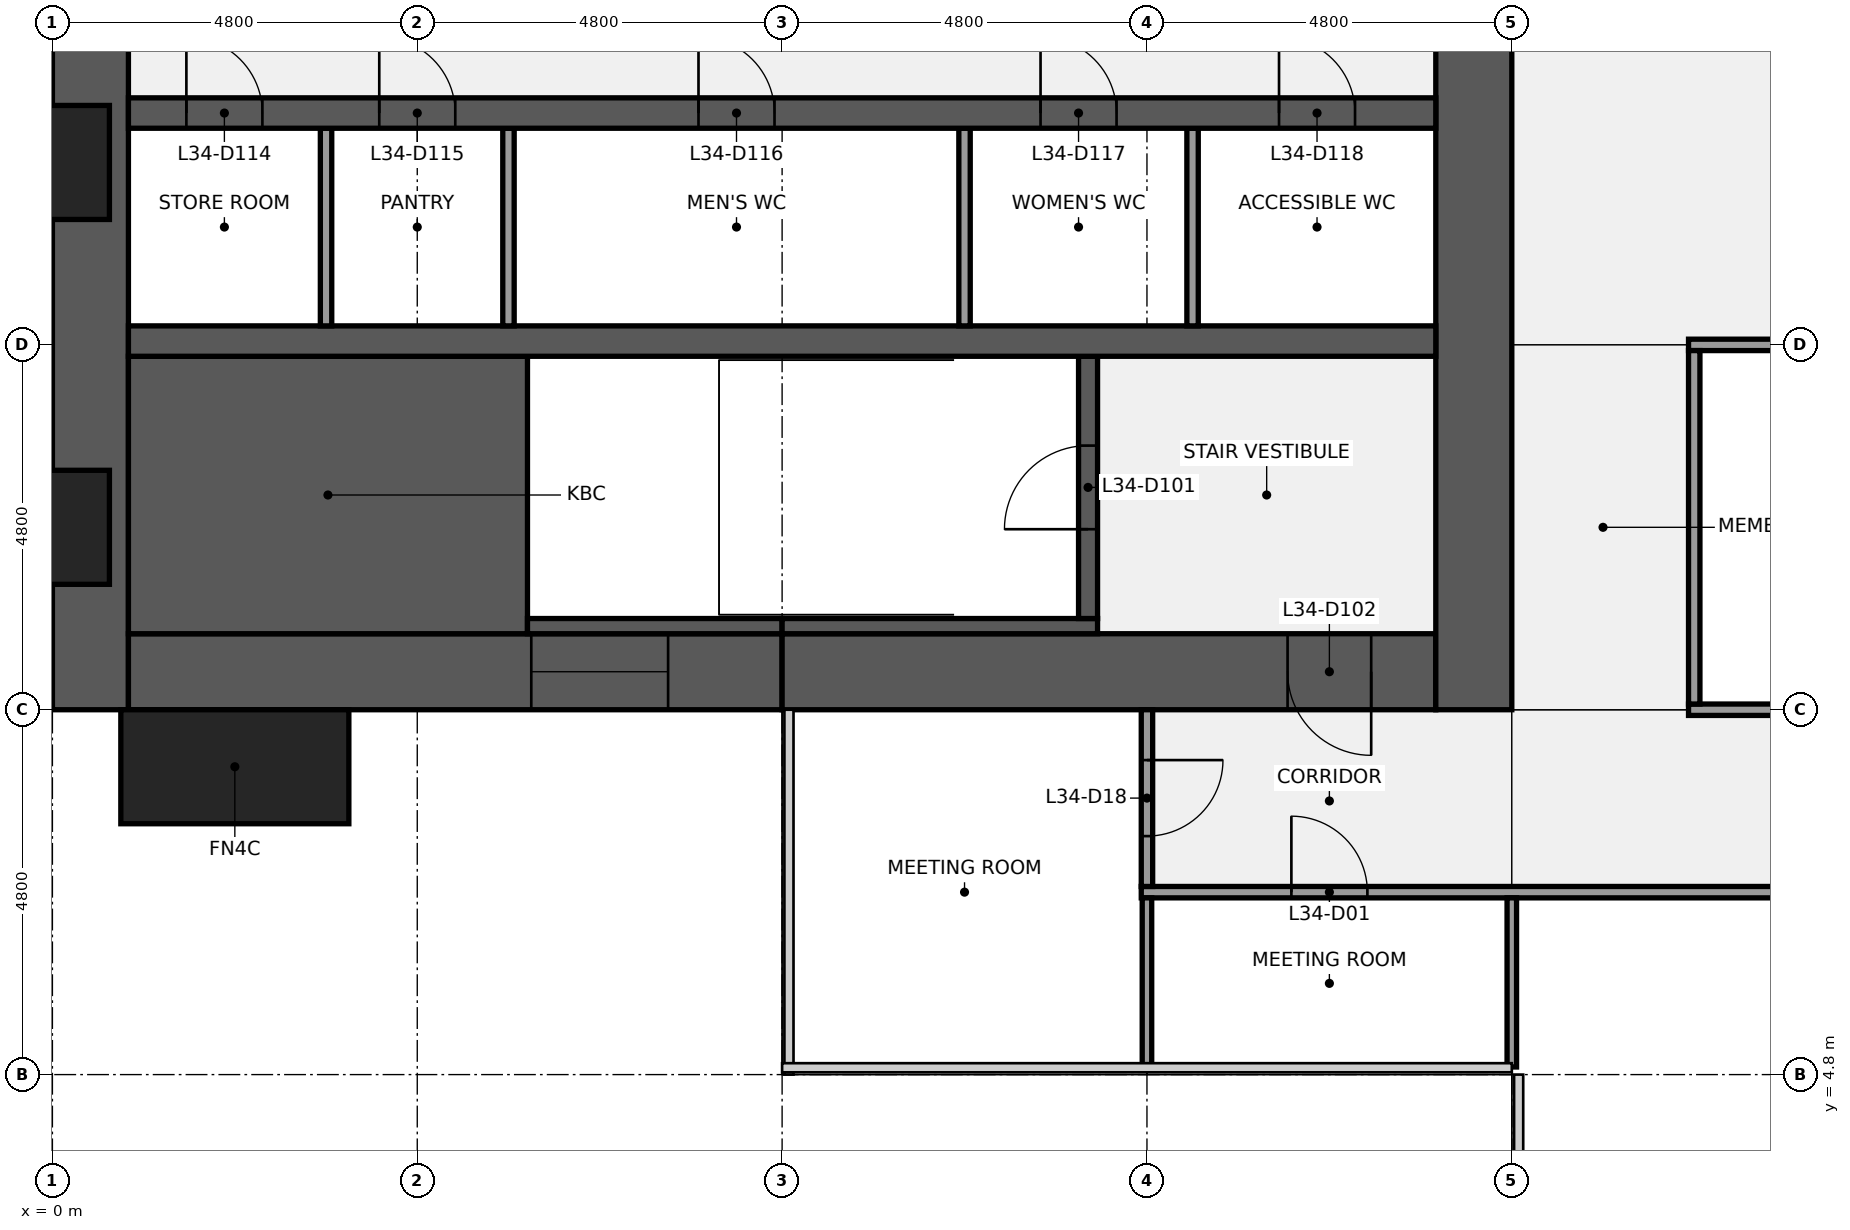
"""IFC4 building model, lengths in metres.
Left out: names, types, materials, properties, quantities, classifications, styles, units other than length and angle.
Written with IfcOpenShell. Run it as: python <this file> out.ifc"""

import sys

from ifc_helpers import new_model, si_unit, direction, frame, frame_2d, origin, origin_2d, place, context, subcontext, project, spatial, rectangle, extrude, element, fill, save


model = new_model("IFC4")
c1 = context("Model", 3, precision=1e-05, world=origin(), true_north=direction((0.0, 1.0)))
c2 = subcontext(c1, "Body", "Model", "MODEL_VIEW")
j1 = project(units=[si_unit("LENGTHUNIT", "METRE"), si_unit("PLANEANGLEUNIT", "RADIAN")], contexts=[c1])
p1 = place(None, origin())
s1 = spatial("IfcSite", under=j1, at=p1, CompositionType="ELEMENT")
p2 = place(p1, origin())
s2 = spatial("IfcBuilding", under=s1, at=p2, CompositionType="ELEMENT")
p3 = place(p2, frame((0.0, 0.0, 156.1)))
s3 = spatial("IfcBuildingStorey", under=s2, at=p3, CompositionType="ELEMENT", Elevation=156.1)
p4 = place(p3, frame((0.5, 9.6, 0.0), z_axis=(0.0, 0.0, 1.0), x_axis=(0.0, 1.0, 0.0)))
e1 = element("IfcWall", 1, at=p4, inside=s3, PredefinedType="SHEAR", context=c2, shape_type="SweptSolid", body=[
    extrude(rectangle(XDim=28.8, YDim=1.0, at=frame_2d((14.4, 0.0))), origin(), (0.0, 0.0, 1.0), 3.84),
])
p5 = place(p4, frame((8.85, 0.0, 0.9)))
e2 = element("IfcOpeningElement", 2, at=p5, cuts=e1, PredefinedType="OPENING", context=c2, shape_type="SweptSolid", body=[
    extrude(rectangle(XDim=1.5, YDim=1.5, at=frame_2d((0.75, 0.75))), frame((0.0, 0.51, 0.0), z_axis=(0.0, -1.0, 0.0), x_axis=(1.0, 0.0, 0.0)), (0.0, 0.0, 1.0), 1.02),
])
p6 = place(p4, frame((18.45, 0.0, 0.9)))
e3 = element("IfcOpeningElement", 3, at=p6, cuts=e1, PredefinedType="OPENING", context=c2, shape_type="SweptSolid", body=[
    extrude(rectangle(XDim=1.5, YDim=1.5, at=frame_2d((0.75, 0.75))), frame((0.0, 0.51, 0.0), z_axis=(0.0, -1.0, 0.0), x_axis=(1.0, 0.0, 0.0)), (0.0, 0.0, 1.0), 1.02),
])
p7 = place(p3, frame((9.6, 10.1, 0.0), z_axis=(0.0, 0.0, 1.0), x_axis=(-1.0, 0.0, 0.0)))
e4 = element("IfcWall", 4, at=p7, inside=s3, PredefinedType="SHEAR", context=c2, shape_type="SweptSolid", body=[
    extrude(rectangle(XDim=8.6, YDim=1.0, at=frame_2d((4.3, 0.0))), origin(), (0.0, 0.0, 1.0), 3.84),
])
p8 = place(p7, frame((1.5, 0.0, 0.9)))
e5 = element("IfcOpeningElement", 5, at=p8, cuts=e4, PredefinedType="OPENING", context=c2, shape_type="SweptSolid", body=[
    extrude(rectangle(XDim=1.8, YDim=1.5, at=frame_2d((0.9, 0.75))), frame((0.0, 0.51, 0.0), z_axis=(0.0, -1.0, 0.0), x_axis=(1.0, 0.0, 0.0)), (0.0, 0.0, 1.0), 1.02),
])
p9 = place(p3, frame((18.2, 10.1, 0.0), z_axis=(0.0, 0.0, 1.0), x_axis=(-1.0, 0.0, 0.0)))
e6 = element("IfcWall", 6, at=p9, inside=s3, PredefinedType="SHEAR", context=c2, shape_type="SweptSolid", body=[
    extrude(rectangle(XDim=8.6, YDim=1.0, at=frame_2d((4.3, 0.0))), origin(), (0.0, 0.0, 1.0), 3.84),
])
p10 = place(p9, frame((0.85, 0.0, 0.0)))
e7 = element("IfcOpeningElement", 7, at=p10, cuts=e6, PredefinedType="OPENING", context=c2, shape_type="SweptSolid", body=[
    extrude(rectangle(XDim=1.1, YDim=2.1, at=frame_2d((0.55, 1.05))), frame((0.0, 0.51, 0.0), z_axis=(0.0, -1.0, 0.0), x_axis=(1.0, 0.0, 0.0)), (0.0, 0.0, 1.0), 1.02),
])
p11 = place(p3, frame((18.7, 38.4, 0.0), z_axis=(0.0, 0.0, 1.0), x_axis=(0.0, -1.0, 0.0)))
e8 = element("IfcWall", 8, at=p11, inside=s3, PredefinedType="SHEAR", context=c2, shape_type="SweptSolid", body=[
    extrude(rectangle(XDim=28.8, YDim=1.0, at=frame_2d((14.4, 0.0))), origin(), (0.0, 0.0, 1.0), 3.84),
])
p12 = place(p11, frame((18.3, 0.0, 0.0)))
e9 = element("IfcOpeningElement", 9, at=p12, cuts=e8, PredefinedType="OPENING", context=c2, shape_type="SweptSolid", body=[
    extrude(rectangle(XDim=1.8, YDim=2.1, at=frame_2d((0.9, 1.05))), frame((0.0, 0.51, 0.0), z_axis=(0.0, -1.0, 0.0), x_axis=(1.0, 0.0, 0.0)), (0.0, 0.0, 1.0), 1.02),
])
p13 = place(p11, frame((8.7, 0.0, 0.0)))
e10 = element("IfcOpeningElement", 10, at=p13, cuts=e8, PredefinedType="OPENING", context=c2, shape_type="SweptSolid", body=[
    extrude(rectangle(XDim=1.8, YDim=2.1, at=frame_2d((0.9, 1.05))), frame((0.0, 0.51, 0.0), z_axis=(0.0, -1.0, 0.0), x_axis=(1.0, 0.0, 0.0)), (0.0, 0.0, 1.0), 1.02),
])
p14 = place(p3, frame((1.0, 12.425, 0.0), z_axis=(0.0, 0.0, 1.0), x_axis=(1.0, 0.0, 0.0)))
e11 = element("IfcWall", 11, at=p14, inside=s3, PredefinedType="SHEAR", context=c2, shape_type="SweptSolid", body=[
    extrude(rectangle(XDim=5.25, YDim=3.65, at=frame_2d((2.625, 0.0))), origin(), (0.0, 0.0, 1.0), 3.84),
])
p15 = place(p3, frame((6.25, 10.7, 0.0), z_axis=(0.0, 0.0, 1.0), x_axis=(1.0, 0.0, 0.0)))
e12 = element("IfcWall", 12, at=p15, inside=s3, PredefinedType="SHEAR", context=c2, shape_type="SweptSolid", body=[
    extrude(rectangle(XDim=3.35, YDim=0.2, at=frame_2d((1.675, 0.0))), origin(), (0.0, 0.0, 1.0), 3.84),
])
p16 = place(p3, frame((9.6, 10.7, 0.0), z_axis=(0.0, 0.0, 1.0), x_axis=(1.0, 0.0, 0.0)))
e13 = element("IfcWall", 13, at=p16, inside=s3, PredefinedType="SHEAR", context=c2, shape_type="SweptSolid", body=[
    extrude(rectangle(XDim=4.15, YDim=0.2, at=frame_2d((2.075, 0.0))), origin(), (0.0, 0.0, 1.0), 3.84),
])
p17 = place(p3, frame((13.625, 10.8, 0.0), z_axis=(0.0, 0.0, 1.0), x_axis=(0.0, 1.0, 0.0)))
e14 = element("IfcWall", 14, at=p17, inside=s3, PredefinedType="SHEAR", context=c2, shape_type="SweptSolid", body=[
    extrude(rectangle(XDim=3.45, YDim=0.25, at=frame_2d((1.725, 0.0))), origin(), (0.0, 0.0, 1.0), 3.84),
])
p18 = place(p17, frame((1.175, 0.0, 0.0)))
e15 = element("IfcOpeningElement", 15, at=p18, cuts=e14, PredefinedType="OPENING", context=c2, shape_type="SweptSolid", body=[
    extrude(rectangle(XDim=1.1, YDim=2.1, at=frame_2d((0.55, 1.05))), frame((0.0, 0.135, 0.0), z_axis=(0.0, -1.0, 0.0), x_axis=(1.0, 0.0, 0.0)), (0.0, 0.0, 1.0), 0.27),
])
p19 = place(p3, frame((1.0, 14.45, 0.0), z_axis=(0.0, 0.0, 1.0), x_axis=(1.0, 0.0, 0.0)))
e16 = element("IfcWall", 16, at=p19, inside=s3, PredefinedType="SHEAR", context=c2, shape_type="SweptSolid", body=[
    extrude(rectangle(XDim=17.2, YDim=0.4, at=frame_2d((8.6, 0.0))), origin(), (0.0, 0.0, 1.0), 3.84),
])
for number, where, z_axis, x_axis in (
    (17, (3.6, 14.65, 0.0), (0.0, 0.0, 1.0), (0.0, 1.0, 0.0)),
    (18, (6.0, 14.65, 0.0), (0.0, 0.0, 1.0), (0.0, 1.0, 0.0)),
    (19, (12.0, 14.65, 0.0), (0.0, 0.0, 1.0), (0.0, 1.0, 0.0)),
    (20, (15.0, 14.65, 0.0), (0.0, 0.0, 1.0), (0.0, 1.0, 0.0)),
):
    element("IfcWall", number, at=place(p3, frame(where, z_axis=z_axis, x_axis=x_axis)), inside=s3, PredefinedType="PARTITIONING", context=c2, shape_type="SweptSolid", body=[
        extrude(rectangle(XDim=2.6, YDim=0.15, at=frame_2d((1.3, 0.0))), origin(), (0.0, 0.0, 1.0), 3.84),
    ])
p20 = place(p3, frame((1.0, 17.45, 0.0), z_axis=(0.0, 0.0, 1.0), x_axis=(1.0, 0.0, 0.0)))
e21 = element("IfcWall", 21, at=p20, inside=s3, PredefinedType="SHEAR", context=c2, shape_type="SweptSolid", body=[
    extrude(rectangle(XDim=17.2, YDim=0.4, at=frame_2d((8.6, 0.0))), origin(), (0.0, 0.0, 1.0), 3.84),
])
p21 = place(p20, frame((0.762, 0.0, 0.0)))
e22 = element("IfcOpeningElement", 22, at=p21, cuts=e21, PredefinedType="OPENING", context=c2, shape_type="SweptSolid", body=[
    extrude(rectangle(XDim=1.0, YDim=2.1, at=frame_2d((0.5, 1.05))), frame((0.0, 0.21, 0.0), z_axis=(0.0, -1.0, 0.0), x_axis=(1.0, 0.0, 0.0)), (0.0, 0.0, 1.0), 0.42),
])
p22 = place(p20, frame((3.3, 0.0, 0.0)))
e23 = element("IfcOpeningElement", 23, at=p22, cuts=e21, PredefinedType="OPENING", context=c2, shape_type="SweptSolid", body=[
    extrude(rectangle(XDim=1.0, YDim=2.1, at=frame_2d((0.5, 1.05))), frame((0.0, 0.21, 0.0), z_axis=(0.0, -1.0, 0.0), x_axis=(1.0, 0.0, 0.0)), (0.0, 0.0, 1.0), 0.42),
])
p23 = place(p20, frame((7.5, 0.0, 0.0)))
e24 = element("IfcOpeningElement", 24, at=p23, cuts=e21, PredefinedType="OPENING", context=c2, shape_type="SweptSolid", body=[
    extrude(rectangle(XDim=1.0, YDim=2.1, at=frame_2d((0.5, 1.05))), frame((0.0, 0.21, 0.0), z_axis=(0.0, -1.0, 0.0), x_axis=(1.0, 0.0, 0.0)), (0.0, 0.0, 1.0), 0.42),
])
p24 = place(p20, frame((12.0, 0.0, 0.0)))
e25 = element("IfcOpeningElement", 25, at=p24, cuts=e21, PredefinedType="OPENING", context=c2, shape_type="SweptSolid", body=[
    extrude(rectangle(XDim=1.0, YDim=2.1, at=frame_2d((0.5, 1.05))), frame((0.0, 0.21, 0.0), z_axis=(0.0, -1.0, 0.0), x_axis=(1.0, 0.0, 0.0)), (0.0, 0.0, 1.0), 0.42),
])
p25 = place(p20, frame((15.137, 0.0, 0.0)))
e26 = element("IfcOpeningElement", 26, at=p25, cuts=e21, PredefinedType="OPENING", context=c2, shape_type="SweptSolid", body=[
    extrude(rectangle(XDim=1.0, YDim=2.1, at=frame_2d((0.5, 1.05))), frame((0.0, 0.21, 0.0), z_axis=(0.0, -1.0, 0.0), x_axis=(1.0, 0.0, 0.0)), (0.0, 0.0, 1.0), 0.42),
])
p26 = place(p3, frame((14.325, 7.2, 0.0), z_axis=(0.0, 0.0, 1.0), x_axis=(1.0, 0.0, 0.0)))
e27 = element("IfcWall", 27, at=p26, inside=s3, PredefinedType="PARTITIONING", context=c2, shape_type="SweptSolid", body=[
    extrude(rectangle(XDim=28.95, YDim=0.15, at=frame_2d((14.475, 0.0))), origin(), (0.0, 0.0, 1.0), 2.936),
])
p27 = place(p26, frame((1.975, 0.0, 0.0)))
e28 = element("IfcOpeningElement", 28, at=p27, cuts=e27, PredefinedType="OPENING", context=c2, shape_type="SweptSolid", body=[
    extrude(rectangle(XDim=1.0, YDim=2.1, at=frame_2d((0.5, 1.05))), frame((0.0, 0.085, 0.0), z_axis=(0.0, -1.0, 0.0), x_axis=(1.0, 0.0, 0.0)), (0.0, 0.0, 1.0), 0.17),
])
p28 = place(p26, frame((9.175, 0.0, 0.0)))
e29 = element("IfcOpeningElement", 29, at=p28, cuts=e27, PredefinedType="OPENING", context=c2, shape_type="SweptSolid", body=[
    extrude(rectangle(XDim=1.0, YDim=2.1, at=frame_2d((0.5, 1.05))), frame((0.0, 0.085, 0.0), z_axis=(0.0, -1.0, 0.0), x_axis=(1.0, 0.0, 0.0)), (0.0, 0.0, 1.0), 0.17),
])
p29 = place(p26, frame((18.775, 0.0, 0.0)))
e30 = element("IfcOpeningElement", 30, at=p29, cuts=e27, PredefinedType="OPENING", context=c2, shape_type="SweptSolid", body=[
    extrude(rectangle(XDim=1.0, YDim=2.1, at=frame_2d((0.5, 1.05))), frame((0.0, 0.085, 0.0), z_axis=(0.0, -1.0, 0.0), x_axis=(1.0, 0.0, 0.0)), (0.0, 0.0, 1.0), 0.17),
])
p30 = place(p26, frame((25.975, 0.0, 0.0)))
e31 = element("IfcOpeningElement", 31, at=p30, cuts=e27, PredefinedType="OPENING", context=c2, shape_type="SweptSolid", body=[
    extrude(rectangle(XDim=1.0, YDim=2.1, at=frame_2d((0.5, 1.05))), frame((0.0, 0.085, 0.0), z_axis=(0.0, -1.0, 0.0), x_axis=(1.0, 0.0, 0.0)), (0.0, 0.0, 1.0), 0.17),
])
p31 = place(p3, frame((21.525, 9.6, 0.0), z_axis=(0.0, 0.0, 1.0), x_axis=(1.0, 0.0, 0.0)))
e32 = element("IfcWall", 32, at=p31, inside=s3, PredefinedType="PARTITIONING", context=c2, shape_type="SweptSolid", body=[
    extrude(rectangle(XDim=14.55, YDim=0.15, at=frame_2d((7.275, 0.0))), origin(), (0.0, 0.0, 1.0), 2.936),
])
p32 = place(p31, frame((3.175, 0.0, 0.0)))
e33 = element("IfcOpeningElement", 33, at=p32, cuts=e32, PredefinedType="OPENING", context=c2, shape_type="SweptSolid", body=[
    extrude(rectangle(XDim=1.0, YDim=2.1, at=frame_2d((0.5, 1.05))), frame((0.0, 0.085, 0.0), z_axis=(0.0, -1.0, 0.0), x_axis=(1.0, 0.0, 0.0)), (0.0, 0.0, 1.0), 0.17),
])
p33 = place(p31, frame((10.375, 0.0, 0.0)))
e34 = element("IfcOpeningElement", 34, at=p33, cuts=e32, PredefinedType="OPENING", context=c2, shape_type="SweptSolid", body=[
    extrude(rectangle(XDim=1.0, YDim=2.1, at=frame_2d((0.5, 1.05))), frame((0.0, 0.085, 0.0), z_axis=(0.0, -1.0, 0.0), x_axis=(1.0, 0.0, 0.0)), (0.0, 0.0, 1.0), 0.17),
])
p34 = place(p3, frame((21.525, 14.4, 0.0), z_axis=(0.0, 0.0, 1.0), x_axis=(1.0, 0.0, 0.0)))
e35 = element("IfcWall", 35, at=p34, inside=s3, PredefinedType="PARTITIONING", context=c2, shape_type="SweptSolid", body=[
    extrude(rectangle(XDim=4.95, YDim=0.15, at=frame_2d((2.475, 0.0))), origin(), (0.0, 0.0, 1.0), 2.936),
])
p35 = place(p3, frame((14.4, 4.9, 0.0), z_axis=(0.0, 0.0, 1.0), x_axis=(0.0, 1.0, 0.0)))
e36 = element("IfcWall", 36, at=p35, inside=s3, PredefinedType="PARTITIONING", context=c2, shape_type="SweptSolid", body=[
    extrude(rectangle(XDim=2.225, YDim=0.125, at=frame_2d((1.113, 0.0))), origin(), (0.0, 0.0, 1.0), 2.936),
])
p36 = place(p3, frame((14.4, 7.275, 0.0), z_axis=(0.0, 0.0, 1.0), x_axis=(0.0, 1.0, 0.0)))
e37 = element("IfcWall", 37, at=p36, inside=s3, PredefinedType="PARTITIONING", context=c2, shape_type="SweptSolid", body=[
    extrude(rectangle(XDim=2.325, YDim=0.15, at=frame_2d((1.163, 0.0))), origin(), (0.0, 0.0, 1.0), 2.936),
])
p37 = place(p36, frame((0.663, 0.0, 0.0)))
e38 = element("IfcOpeningElement", 38, at=p37, cuts=e37, PredefinedType="OPENING", context=c2, shape_type="SweptSolid", body=[
    extrude(rectangle(XDim=1.0, YDim=2.1, at=frame_2d((0.5, 1.05))), frame((0.0, 0.085, 0.0), z_axis=(0.0, -1.0, 0.0), x_axis=(1.0, 0.0, 0.0)), (0.0, 0.0, 1.0), 0.17),
])
p38 = place(p3, frame((19.2, 4.9, 0.0), z_axis=(0.0, 0.0, 1.0), x_axis=(0.0, 1.0, 0.0)))
e39 = element("IfcWall", 39, at=p38, inside=s3, PredefinedType="PARTITIONING", context=c2, shape_type="SweptSolid", body=[
    extrude(rectangle(XDim=2.225, YDim=0.125, at=frame_2d((1.113, 0.0))), origin(), (0.0, 0.0, 1.0), 2.936),
])
p39 = place(p3, frame((21.6, 9.675, 0.0), z_axis=(0.0, 0.0, 1.0), x_axis=(0.0, 1.0, 0.0)))
e40 = element("IfcWall", 40, at=p39, inside=s3, PredefinedType="PARTITIONING", context=c2, shape_type="SweptSolid", body=[
    extrude(rectangle(XDim=4.65, YDim=0.15, at=frame_2d((2.325, 0.0))), origin(), (0.0, 0.0, 1.0), 2.936),
])
p40 = place(p3, frame((2.4, 8.85, 0.0), z_axis=(0.0, 0.0, 1.0), x_axis=(1.0, 0.0, 0.0)))
e41 = element("IfcColumn", 41, at=p40, inside=s3, PredefinedType="PILASTER", context=c2, shape_type="SweptSolid", body=[
    extrude(rectangle(XDim=3.0, YDim=1.5, at=origin_2d()), origin(), (0.0, 0.0, 1.0), 4.0),
])
p41 = place(p18, origin())
e42 = element("IfcDoor", 42, at=p41, inside=s3, OperationType="SINGLE_SWING_LEFT", PredefinedType="DOOR", context=c2, shape_type="SweptSolid", body=[
    extrude(rectangle(XDim=1.1, YDim=2.1, at=frame_2d((0.55, 1.05))), frame((0.0, 0.025, 0.0), z_axis=(0.0, -1.0, 0.0), x_axis=(1.0, 0.0, 0.0)), (0.0, 0.0, 1.0), 0.05),
])
fill(e15, e42)
p42 = place(p10, origin())
e43 = element("IfcDoor", 43, at=p42, inside=s3, OperationType="SINGLE_SWING_LEFT", PredefinedType="DOOR", context=c2, shape_type="SweptSolid", body=[
    extrude(rectangle(XDim=1.1, YDim=2.1, at=frame_2d((0.55, 1.05))), frame((0.0, 0.025, 0.0), z_axis=(0.0, -1.0, 0.0), x_axis=(1.0, 0.0, 0.0)), (0.0, 0.0, 1.0), 0.05),
])
fill(e7, e43)
p43 = place(p21, origin())
e44 = element("IfcDoor", 44, at=p43, inside=s3, OperationType="SINGLE_SWING_LEFT", PredefinedType="DOOR", context=c2, shape_type="SweptSolid", body=[
    extrude(rectangle(XDim=1.0, YDim=2.1, at=frame_2d((0.5, 1.05))), frame((0.0, 0.025, 0.0), z_axis=(0.0, -1.0, 0.0), x_axis=(1.0, 0.0, 0.0)), (0.0, 0.0, 1.0), 0.05),
])
fill(e22, e44)
p44 = place(p22, origin())
e45 = element("IfcDoor", 45, at=p44, inside=s3, OperationType="SINGLE_SWING_LEFT", PredefinedType="DOOR", context=c2, shape_type="SweptSolid", body=[
    extrude(rectangle(XDim=1.0, YDim=2.1, at=frame_2d((0.5, 1.05))), frame((0.0, 0.025, 0.0), z_axis=(0.0, -1.0, 0.0), x_axis=(1.0, 0.0, 0.0)), (0.0, 0.0, 1.0), 0.05),
])
fill(e23, e45)
p45 = place(p23, origin())
e46 = element("IfcDoor", 46, at=p45, inside=s3, OperationType="SINGLE_SWING_LEFT", PredefinedType="DOOR", context=c2, shape_type="SweptSolid", body=[
    extrude(rectangle(XDim=1.0, YDim=2.1, at=frame_2d((0.5, 1.05))), frame((0.0, 0.025, 0.0), z_axis=(0.0, -1.0, 0.0), x_axis=(1.0, 0.0, 0.0)), (0.0, 0.0, 1.0), 0.05),
])
fill(e24, e46)
p46 = place(p24, origin())
e47 = element("IfcDoor", 47, at=p46, inside=s3, OperationType="SINGLE_SWING_LEFT", PredefinedType="DOOR", context=c2, shape_type="SweptSolid", body=[
    extrude(rectangle(XDim=1.0, YDim=2.1, at=frame_2d((0.5, 1.05))), frame((0.0, 0.025, 0.0), z_axis=(0.0, -1.0, 0.0), x_axis=(1.0, 0.0, 0.0)), (0.0, 0.0, 1.0), 0.05),
])
fill(e25, e47)
p47 = place(p25, origin())
e48 = element("IfcDoor", 48, at=p47, inside=s3, OperationType="SINGLE_SWING_LEFT", PredefinedType="DOOR", context=c2, shape_type="SweptSolid", body=[
    extrude(rectangle(XDim=1.0, YDim=2.1, at=frame_2d((0.5, 1.05))), frame((0.0, 0.025, 0.0), z_axis=(0.0, -1.0, 0.0), x_axis=(1.0, 0.0, 0.0)), (0.0, 0.0, 1.0), 0.05),
])
fill(e26, e48)
p48 = place(p8, origin())
e49 = element("IfcWindow", 49, at=p48, inside=s3, PartitioningType="SINGLE_PANEL", PredefinedType="WINDOW", context=c2, shape_type="SweptSolid", body=[
    extrude(rectangle(XDim=1.8, YDim=1.5, at=frame_2d((0.9, 0.75))), frame((0.0, 0.03, 0.0), z_axis=(0.0, -1.0, 0.0), x_axis=(1.0, 0.0, 0.0)), (0.0, 0.0, 1.0), 0.06),
])
fill(e5, e49)
p49 = place(p27, origin())
e50 = element("IfcDoor", 50, at=p49, inside=s3, OperationType="SINGLE_SWING_LEFT", PredefinedType="DOOR", context=c2, shape_type="SweptSolid", body=[
    extrude(rectangle(XDim=1.0, YDim=2.1, at=frame_2d((0.5, 1.05))), frame((0.0, 0.025, 0.0), z_axis=(0.0, -1.0, 0.0), x_axis=(1.0, 0.0, 0.0)), (0.0, 0.0, 1.0), 0.05),
])
fill(e28, e50)
p50 = place(p37, origin())
e51 = element("IfcDoor", 51, at=p50, inside=s3, OperationType="SINGLE_SWING_RIGHT", PredefinedType="DOOR", context=c2, shape_type="SweptSolid", body=[
    extrude(rectangle(XDim=1.0, YDim=2.1, at=frame_2d((0.5, 1.05))), frame((0.0, 0.025, 0.0), z_axis=(0.0, -1.0, 0.0), x_axis=(1.0, 0.0, 0.0)), (0.0, 0.0, 1.0), 0.05),
])
fill(e38, e51)
save(model, sys.argv[1])
